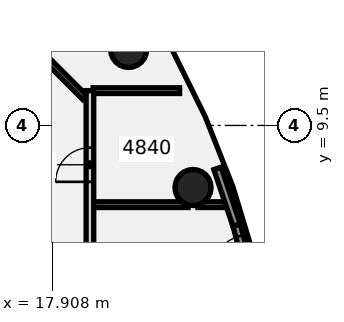
"""IFC4 building model, lengths in metres.
Left out: names, types, materials, properties, quantities, classifications, styles, units other than length and angle.
Written with IfcOpenShell. Run it as: python <this file> out.ifc"""

import sys

from ifc_helpers import new_model, si_unit, direction, frame, frame_2d, origin, origin_2d, place, context, subcontext, project, spatial, rectangle, circle, extrude, element, fill, save


model = new_model("IFC4")
c1 = context("Model", 3, precision=1e-05, world=origin(), true_north=direction((0.0, 1.0)))
c2 = subcontext(c1, "Body", "Model", "MODEL_VIEW")
j1 = project(units=[si_unit("LENGTHUNIT", "METRE"), si_unit("PLANEANGLEUNIT", "RADIAN")], contexts=[c1])
p1 = place(None, origin())
s1 = spatial("IfcSite", under=j1, at=p1, CompositionType="ELEMENT")
p2 = place(p1, origin())
s2 = spatial("IfcBuilding", under=s1, at=p2, CompositionType="ELEMENT")
p3 = place(p2, frame((0.0, 0.0, 193.3)))
s3 = spatial("IfcBuildingStorey", under=s2, at=p3, CompositionType="ELEMENT", Elevation=193.3)
for number, where, z_axis, x_axis in (
    (1, (21.613, 7.866, -0.14), (0.0, 0.0, 1.0), (1.0, 0.0, 0.0)),
    (2, (19.919, 11.5, -0.14), (0.0, 0.0, 1.0), (1.0, 0.0, 0.0)),
):
    element("IfcColumn", number, at=place(p3, frame(where, z_axis=z_axis, x_axis=x_axis)), inside=s3, PredefinedType="COLUMN", context=c2, shape_type="SweptSolid", body=[
        extrude(circle(Radius=0.475, at=origin_2d()), origin(), (0.0, 0.0, 1.0), 3.6),
    ])
p4 = place(p3, frame((17.128, 11.872, 0.0), z_axis=(0.0, 0.0, 1.0), x_axis=(0.707106781187, -0.707106781187, 0.0)))
e3 = element("IfcWall", 3, at=p4, inside=s3, PredefinedType="PARTITIONING", context=c2, shape_type="SweptSolid", body=[
    extrude(rectangle(XDim=2.315, YDim=0.15, at=frame_2d((1.158, 0.0))), origin(), (0.0, 0.0, 1.0), 2.864),
])
p5 = place(p3, frame((18.985, 10.416, 0.0), z_axis=(0.0, 0.0, 1.0), x_axis=(1.0, 0.0, 0.0)))
e4 = element("IfcWall", 4, at=p5, inside=s3, PredefinedType="PARTITIONING", context=c2, shape_type="SweptSolid", body=[
    extrude(rectangle(XDim=2.275, YDim=0.15, at=frame_2d((1.138, 0.0))), origin(), (0.0, 0.0, 1.0), 2.864),
])
p6 = place(p3, frame((18.985, 7.416, 0.0), z_axis=(0.0, 0.0, 1.0), x_axis=(1.0, 0.0, 0.0)))
e5 = element("IfcWall", 5, at=p6, inside=s3, PredefinedType="PARTITIONING", context=c2, shape_type="SweptSolid", body=[
    extrude(rectangle(XDim=2.499, YDim=0.15, at=frame_2d((1.25, 0.0))), origin(), (0.0, 0.0, 1.0), 2.864),
])
p7 = place(p3, frame((21.742, 7.416, 0.0), z_axis=(0.0, 0.0, 1.0), x_axis=(1.0, 0.0, 0.0)))
e6 = element("IfcWall", 6, at=p7, inside=s3, PredefinedType="PARTITIONING", context=c2, shape_type="SweptSolid", body=[
    extrude(rectangle(XDim=0.749, YDim=0.15, at=frame_2d((0.375, 0.0))), origin(), (0.0, 0.0, 1.0), 2.864),
])
p8 = place(p3, frame((18.9, -14.277, 0.0), z_axis=(0.0, 0.0, 1.0), x_axis=(0.0, 1.0, 0.0)))
e7 = element("IfcWall", 7, at=p8, inside=s3, PredefinedType="PARTITIONING", context=c2, shape_type="SweptSolid", body=[
    extrude(rectangle(XDim=24.693, YDim=0.2, at=frame_2d((12.347, 0.0))), origin(), (0.0, 0.0, 1.0), 2.864),
])
p9 = place(p8, frame((5.077, 0.0, 0.0)))
e8 = element("IfcOpeningElement", 8, at=p9, cuts=e7, PredefinedType="OPENING", context=c2, shape_type="SweptSolid", body=[
    extrude(rectangle(XDim=0.9, YDim=2.1, at=frame_2d((0.45, 1.05))), frame((0.0, 0.11, 0.0), z_axis=(0.0, -1.0, 0.0), x_axis=(1.0, 0.0, 0.0)), (0.0, 0.0, 1.0), 0.22),
])
p10 = place(p8, frame((22.293, 0.0, 0.0)))
e9 = element("IfcOpeningElement", 9, at=p10, cuts=e7, PredefinedType="OPENING", context=c2, shape_type="SweptSolid", body=[
    extrude(rectangle(XDim=0.9, YDim=2.1, at=frame_2d((0.45, 1.05))), frame((0.0, 0.11, 0.0), z_axis=(0.0, -1.0, 0.0), x_axis=(1.0, 0.0, 0.0)), (0.0, 0.0, 1.0), 0.22),
])
p11 = place(p3, frame((22.759, 6.877, 0.0), z_axis=(0.0, 0.0, 1.0), x_axis=(-0.318829263815, 0.947812165218, 0.0)))
e10 = element("IfcWall", 10, at=p11, inside=s3, PredefinedType="SOLIDWALL", context=c2, shape_type="SweptSolid", body=[
    extrude(rectangle(XDim=1.576, YDim=0.2, at=frame_2d((0.788, 0.0))), origin(), (0.0, 0.0, 1.0), 3.46),
])
p12 = place(p3, frame((23.173, 5.333, 0.0), z_axis=(0.0, 0.0, 1.0), x_axis=(-0.258565587593, 0.965993704386, 0.0)))
e11 = element("IfcWall", 11, at=p12, inside=s3, PredefinedType="SOLIDWALL", context=c2, shape_type="SweptSolid", body=[
    extrude(rectangle(XDim=1.599, YDim=0.2, at=frame_2d((0.799, 0.0))), origin(), (0.0, 0.0, 1.0), 3.46),
])
p13 = place(p12, frame((0.299, 0.0, 0.0)))
e12 = element("IfcOpeningElement", 12, at=p13, cuts=e11, PredefinedType="OPENING", context=c2, shape_type="SweptSolid", body=[
    extrude(rectangle(XDim=1.0, YDim=2.4, at=frame_2d((0.5, 1.2))), frame((0.0, 0.11, 0.0), z_axis=(0.0, -1.0, 0.0), x_axis=(1.0, 0.0, 0.0)), (0.0, 0.0, 1.0), 0.22),
])
p14 = place(p10, frame((0.9, 0.0, 0.0), z_axis=(0.0, 0.0, 1.0), x_axis=(-1.0, 0.0, 0.0)))
e13 = element("IfcDoor", 13, at=p14, inside=s3, OperationType="SINGLE_SWING_RIGHT", PredefinedType="DOOR", context=c2, shape_type="SweptSolid", body=[
    extrude(rectangle(XDim=0.9, YDim=2.1, at=frame_2d((0.45, 1.05))), frame((0.0, 0.025, 0.0), z_axis=(0.0, -1.0, 0.0), x_axis=(1.0, 0.0, 0.0)), (0.0, 0.0, 1.0), 0.05),
])
fill(e9, e13)
p15 = place(p13, origin())
e14 = element("IfcDoor", 14, at=p15, inside=s3, OperationType="SINGLE_SWING_LEFT", PredefinedType="DOOR", context=c2, shape_type="SweptSolid", body=[
    extrude(rectangle(XDim=1.0, YDim=2.4, at=frame_2d((0.5, 1.2))), frame((0.0, 0.025, 0.0), z_axis=(0.0, -1.0, 0.0), x_axis=(1.0, 0.0, 0.0)), (0.0, 0.0, 1.0), 0.05),
])
fill(e12, e14)
save(model, sys.argv[1])
